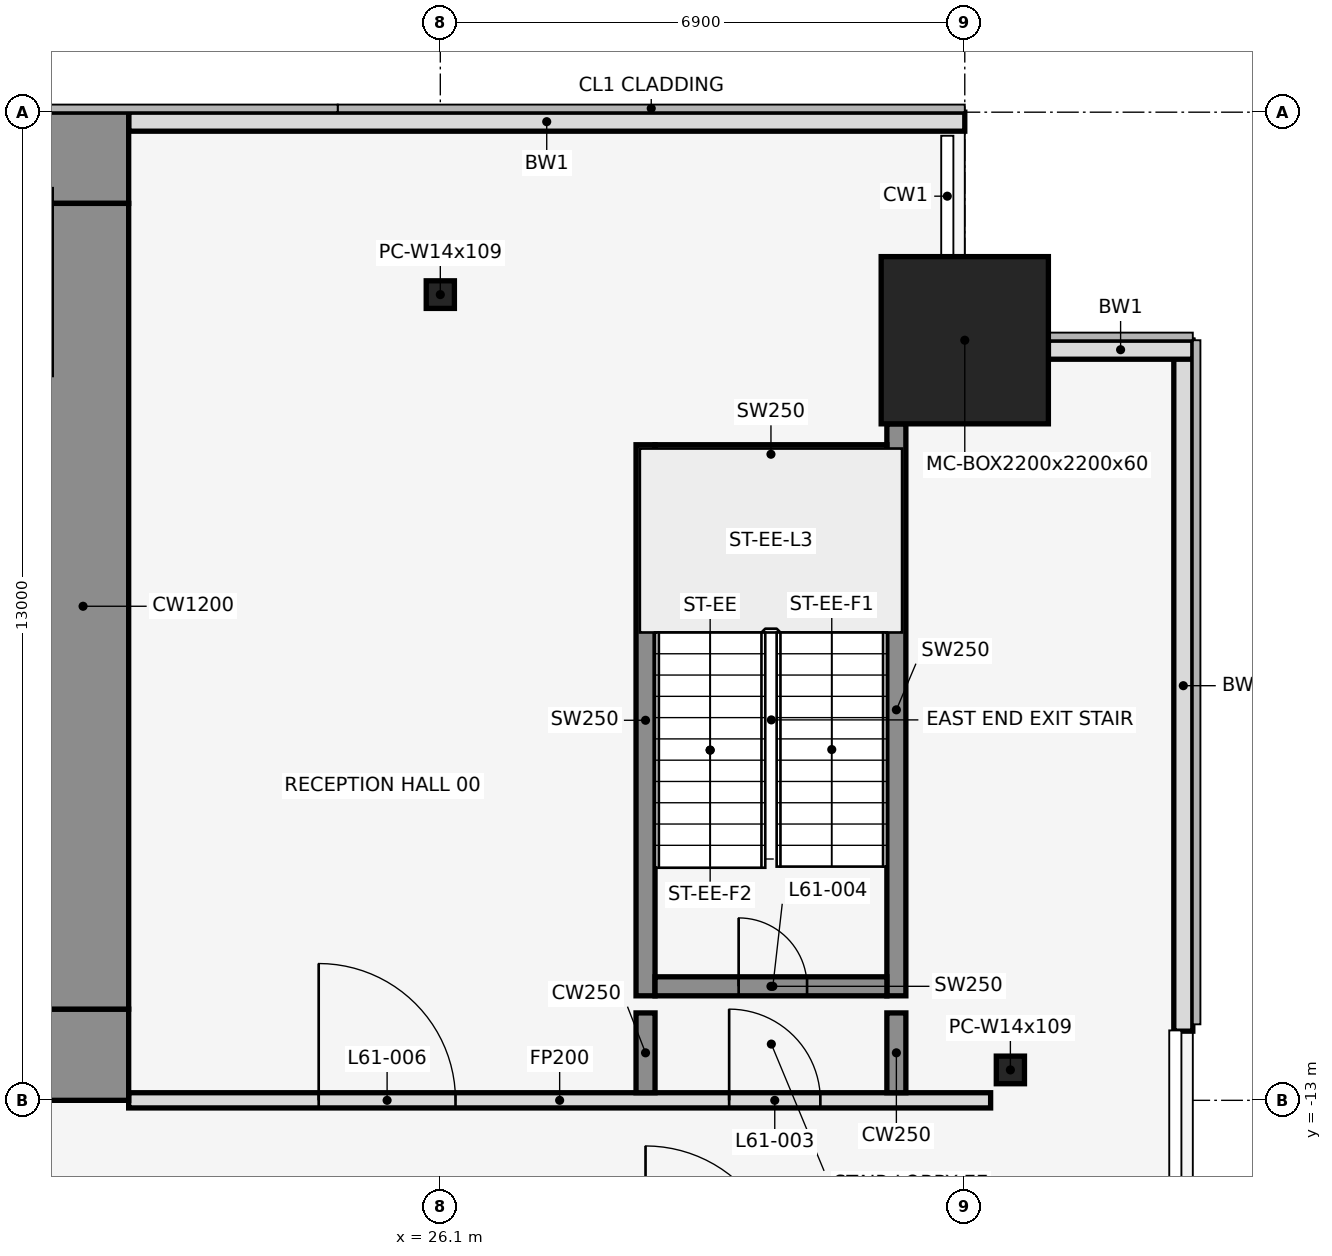
"""IFC4 building model, lengths in metres.
Left out: names, types, materials, properties, quantities, classifications, styles, units other than length and angle.
Written with IfcOpenShell. Run it as: python <this file> out.ifc"""

import sys

from ifc_helpers import new_model, si_unit, direction, frame, frame_2d, origin, origin_2d, place, context, subcontext, project, spatial, rectangle, hollow_rectangle, i_section, extrude, element, fill, save


model = new_model("IFC4")
c1 = context("Model", 3, precision=1e-05, world=origin(), true_north=direction((0.0, 1.0)))
c2 = subcontext(c1, "Body", "Model", "MODEL_VIEW")
j1 = project(units=[si_unit("LENGTHUNIT", "METRE"), si_unit("PLANEANGLEUNIT", "RADIAN")], contexts=[c1])
p1 = place(None, origin())
s1 = spatial("IfcSite", under=j1, at=p1, CompositionType="ELEMENT")
p2 = place(p1, origin())
s2 = spatial("IfcBuilding", under=s1, at=p2, CompositionType="ELEMENT")
p3 = place(p2, frame((0.0, 0.0, 270.8)))
s3 = spatial("IfcBuildingStorey", under=s2, at=p3, CompositionType="ELEMENT", Elevation=270.8)
p4 = place(p3, frame((26.1, -2.4, 0.0), z_axis=(0.0, 0.0, 1.0), x_axis=(1.0, 0.0, 0.0)))
e1 = element("IfcColumn", 1, at=p4, inside=s3, PredefinedType="COLUMN", context=c2, shape_type="SweptSolid", body=[
    extrude(i_section(OverallWidth=0.371, OverallDepth=0.363, WebThickness=0.013, FlangeThickness=0.022, at=origin_2d()), origin(), (0.0, 0.0, 1.0), 4.2),
])
p5 = place(p3, frame((33.0, -3.0, 0.0), z_axis=(0.0, 0.0, 1.0), x_axis=(1.0, 0.0, 0.0)))
e2 = element("IfcColumn", 2, at=p5, inside=s3, PredefinedType="COLUMN", context=c2, shape_type="SweptSolid", body=[
    extrude(hollow_rectangle(XDim=2.2, YDim=2.2, WallThickness=0.06, at=origin_2d()), origin(), (0.0, 0.0, 1.0), 4.2),
])
p6 = place(p3, frame((33.6, -12.6, 0.0), z_axis=(0.0, 0.0, 1.0), x_axis=(1.0, 0.0, 0.0)))
e3 = element("IfcColumn", 3, at=p6, inside=s3, PredefinedType="COLUMN", context=c2, shape_type="SweptSolid", body=[
    extrude(i_section(OverallWidth=0.371, OverallDepth=0.363, WebThickness=0.013, FlangeThickness=0.022, at=origin_2d()), origin(), (0.0, 0.0, 1.0), 4.2),
])
p7 = place(p3, frame((33.0, -0.125, 0.0), z_axis=(0.0, 0.0, 1.0), x_axis=(-1.0, 0.0, 0.0)))
e4 = element("IfcWall", 4, at=p7, inside=s3, PredefinedType="STANDARD", context=c2, shape_type="SweptSolid", body=[
    extrude(rectangle(XDim=11.0, YDim=0.25, at=frame_2d((5.5, 0.0))), origin(), (0.0, 0.0, 1.0), 4.05),
])
p8 = place(p3, frame((35.875, -12.09, 0.0), z_axis=(0.0, 0.0, 1.0), x_axis=(0.0, 1.0, 0.0)))
e5 = element("IfcWall", 5, at=p8, inside=s3, PredefinedType="STANDARD", context=c2, shape_type="SweptSolid", body=[
    extrude(rectangle(XDim=9.09, YDim=0.25, at=frame_2d((4.545, 0.0))), origin(), (0.0, 0.0, 1.0), 4.05),
])
p9 = place(p3, frame((36.0, -3.125, 0.0), z_axis=(0.0, 0.0, 1.0), x_axis=(-1.0, 0.0, 0.0)))
e6 = element("IfcWall", 6, at=p9, inside=s3, PredefinedType="STANDARD", context=c2, shape_type="SweptSolid", body=[
    extrude(rectangle(XDim=1.9, YDim=0.25, at=frame_2d((0.95, 0.0))), origin(), (0.0, 0.0, 1.0), 4.05),
])
p10 = place(p3, frame((28.8, -11.625, 0.0), z_axis=(0.0, 0.0, 1.0), x_axis=(0.0, 1.0, 0.0)))
e7 = element("IfcWall", 7, at=p10, inside=s3, PredefinedType="SHEAR", context=c2, shape_type="SweptSolid", body=[
    extrude(rectangle(XDim=7.25, YDim=0.25, at=frame_2d((3.625, 0.0))), origin(), (0.0, 0.0, 1.0), 4.2),
])
p11 = place(p3, frame((32.1, -11.625, 0.0), z_axis=(0.0, 0.0, 1.0), x_axis=(0.0, 1.0, 0.0)))
e8 = element("IfcWall", 8, at=p11, inside=s3, PredefinedType="SHEAR", context=c2, shape_type="SweptSolid", body=[
    extrude(rectangle(XDim=7.525, YDim=0.25, at=frame_2d((3.762, 0.0))), origin(), (0.0, 0.0, 1.0), 4.2),
])
p12 = place(p3, frame((28.925, -11.5, 0.0), z_axis=(0.0, 0.0, 1.0), x_axis=(1.0, 0.0, 0.0)))
e9 = element("IfcWall", 9, at=p12, inside=s3, PredefinedType="SHEAR", context=c2, shape_type="SweptSolid", body=[
    extrude(rectangle(XDim=3.05, YDim=0.25, at=frame_2d((1.525, 0.0))), origin(), (0.0, 0.0, 1.0), 4.2),
])
p13 = place(p12, frame((1.1, 0.0, 0.0)))
e10 = element("IfcOpeningElement", 10, at=p13, cuts=e9, PredefinedType="OPENING", context=c2, shape_type="SweptSolid", body=[
    extrude(rectangle(XDim=0.9, YDim=2.1, at=frame_2d((0.45, 1.05))), frame((0.0, 0.137, 0.0), z_axis=(0.0, -1.0, 0.0), x_axis=(1.0, 0.0, 0.0)), (0.0, 0.0, 1.0), 0.274),
])
p14 = place(p3, frame((28.925, -4.5, 0.0), z_axis=(0.0, 0.0, 1.0), x_axis=(1.0, 0.0, 0.0)))
e11 = element("IfcWall", 11, at=p14, inside=s3, PredefinedType="SHEAR", context=c2, shape_type="SweptSolid", body=[
    extrude(rectangle(XDim=3.05, YDim=0.25, at=frame_2d((1.525, 0.0))), origin(), (0.0, 0.0, 1.0), 4.2),
])
p15 = place(p3, frame((22.0, -13.0, 0.0), z_axis=(0.0, 0.0, 1.0), x_axis=(1.0, 0.0, 0.0)))
e12 = element("IfcWall", 12, at=p15, inside=s3, PredefinedType="PARTITIONING", context=c2, shape_type="SweptSolid", body=[
    extrude(rectangle(XDim=11.34, YDim=0.2, at=frame_2d((5.67, 0.0))), origin(), (0.0, 0.0, 1.0), 3.118),
])
p16 = place(p15, frame((7.9, 0.0, 0.0)))
e13 = element("IfcOpeningElement", 13, at=p16, cuts=e12, PredefinedType="OPENING", context=c2, shape_type="SweptSolid", body=[
    extrude(rectangle(XDim=1.2, YDim=2.1, at=frame_2d((0.6, 1.05))), frame((0.0, 0.112, 0.0), z_axis=(0.0, -1.0, 0.0), x_axis=(1.0, 0.0, 0.0)), (0.0, 0.0, 1.0), 0.224),
])
p17 = place(p15, frame((2.5, 0.0, 0.0)))
e14 = element("IfcOpeningElement", 14, at=p17, cuts=e12, PredefinedType="OPENING", context=c2, shape_type="SweptSolid", body=[
    extrude(rectangle(XDim=1.8, YDim=2.1, at=frame_2d((0.9, 1.05))), frame((0.0, 0.112, 0.0), z_axis=(0.0, -1.0, 0.0), x_axis=(1.0, 0.0, 0.0)), (0.0, 0.0, 1.0), 0.224),
])
for number, where, z_axis, x_axis in (
    (15, (28.8, -12.9, 0.0), (0.0, 0.0, 1.0), (0.0, 1.0, 0.0)),
    (16, (32.1, -12.9, 0.0), (0.0, 0.0, 1.0), (0.0, 1.0, 0.0)),
):
    element("IfcWall", number, at=place(p3, frame(where, z_axis=z_axis, x_axis=x_axis)), inside=s3, PredefinedType="SHEAR", context=c2, shape_type="SweptSolid", body=[
        extrude(rectangle(XDim=1.05, YDim=0.25, at=frame_2d((0.525, 0.0))), origin(), (0.0, 0.0, 1.0), 4.2),
    ])
p18 = place(p3, frame((-22.0, -0.6, 0.0), z_axis=(0.0, 0.0, 1.0), x_axis=(1.0, 0.0, 0.0)))
e17 = element("IfcWall", 17, at=p18, inside=s3, PredefinedType="SHEAR", context=c2, shape_type="SweptSolid", body=[
    extrude(rectangle(XDim=44.0, YDim=1.2, at=frame_2d((22.0, 0.0))), origin(), (0.0, 0.0, 1.0), 4.2),
])
p19 = place(p18, frame((18.55, 0.0, 0.0)))
e18 = element("IfcOpeningElement", 18, at=p19, cuts=e17, PredefinedType="OPENING", context=c2, shape_type="SweptSolid", body=[
    extrude(rectangle(XDim=0.9, YDim=2.1, at=frame_2d((0.45, 1.05))), frame((0.0, 0.612, 0.0), z_axis=(0.0, -1.0, 0.0), x_axis=(1.0, 0.0, 0.0)), (0.0, 0.0, 1.0), 1.224),
])
p20 = place(p18, frame((24.55, 0.0, 0.0)))
e19 = element("IfcOpeningElement", 19, at=p20, cuts=e17, PredefinedType="OPENING", context=c2, shape_type="SweptSolid", body=[
    extrude(rectangle(XDim=0.9, YDim=2.1, at=frame_2d((0.45, 1.05))), frame((0.0, 0.612, 0.0), z_axis=(0.0, -1.0, 0.0), x_axis=(1.0, 0.0, 0.0)), (0.0, 0.0, 1.0), 1.224),
])
p21 = place(p3, frame((-22.0, -12.4, 0.0), z_axis=(0.0, 0.0, 1.0), x_axis=(1.0, 0.0, 0.0)))
e20 = element("IfcWall", 20, at=p21, inside=s3, PredefinedType="SHEAR", context=c2, shape_type="SweptSolid", body=[
    extrude(rectangle(XDim=44.0, YDim=1.2, at=frame_2d((22.0, 0.0))), origin(), (0.0, 0.0, 1.0), 4.2),
])
p22 = place(p21, frame((2.2, 0.0, 0.0)))
e21 = element("IfcOpeningElement", 21, at=p22, cuts=e20, PredefinedType="OPENING", context=c2, shape_type="SweptSolid", body=[
    extrude(rectangle(XDim=1.2, YDim=2.1, at=frame_2d((0.6, 1.05))), frame((0.0, 0.612, 0.0), z_axis=(0.0, -1.0, 0.0), x_axis=(1.0, 0.0, 0.0)), (0.0, 0.0, 1.0), 1.224),
])
p23 = place(p21, frame((21.4, 0.0, 0.0)))
e22 = element("IfcOpeningElement", 22, at=p23, cuts=e20, PredefinedType="OPENING", context=c2, shape_type="SweptSolid", body=[
    extrude(rectangle(XDim=1.2, YDim=2.1, at=frame_2d((0.6, 1.05))), frame((0.0, 0.612, 0.0), z_axis=(0.0, -1.0, 0.0), x_axis=(1.0, 0.0, 0.0)), (0.0, 0.0, 1.0), 1.224),
])
p24 = place(p21, frame((40.6, 0.0, 0.0)))
e23 = element("IfcOpeningElement", 23, at=p24, cuts=e20, PredefinedType="OPENING", context=c2, shape_type="SweptSolid", body=[
    extrude(rectangle(XDim=1.2, YDim=2.1, at=frame_2d((0.6, 1.05))), frame((0.0, 0.612, 0.0), z_axis=(0.0, -1.0, 0.0), x_axis=(1.0, 0.0, 0.0)), (0.0, 0.0, 1.0), 1.224),
])
p25 = place(p21, frame((16.0, 0.0, 0.0)))
e24 = element("IfcOpeningElement", 24, at=p25, cuts=e20, PredefinedType="OPENING", context=c2, shape_type="SweptSolid", body=[
    extrude(rectangle(XDim=1.8, YDim=2.1, at=frame_2d((0.9, 1.05))), frame((0.0, 0.612, 0.0), z_axis=(0.0, -1.0, 0.0), x_axis=(1.0, 0.0, 0.0)), (0.0, 0.0, 1.0), 1.224),
])
p26 = place(p21, frame((6.3, 0.0, 0.0)))
e25 = element("IfcOpeningElement", 25, at=p26, cuts=e20, PredefinedType="OPENING", context=c2, shape_type="SweptSolid", body=[
    extrude(rectangle(XDim=1.2, YDim=2.1, at=frame_2d((0.6, 1.05))), frame((0.0, 0.612, 0.0), z_axis=(0.0, -1.0, 0.0), x_axis=(1.0, 0.0, 0.0)), (0.0, 0.0, 1.0), 1.224),
])
p27 = place(p21, frame((26.2, 0.0, 0.0)))
e26 = element("IfcOpeningElement", 26, at=p27, cuts=e20, PredefinedType="OPENING", context=c2, shape_type="SweptSolid", body=[
    extrude(rectangle(XDim=1.8, YDim=2.1, at=frame_2d((0.9, 1.05))), frame((0.0, 0.612, 0.0), z_axis=(0.0, -1.0, 0.0), x_axis=(1.0, 0.0, 0.0)), (0.0, 0.0, 1.0), 1.224),
])
p28 = place(p21, frame((36.5, 0.0, 0.0)))
e27 = element("IfcOpeningElement", 27, at=p28, cuts=e20, PredefinedType="OPENING", context=c2, shape_type="SweptSolid", body=[
    extrude(rectangle(XDim=1.2, YDim=2.1, at=frame_2d((0.6, 1.05))), frame((0.0, 0.612, 0.0), z_axis=(0.0, -1.0, 0.0), x_axis=(1.0, 0.0, 0.0)), (0.0, 0.0, 1.0), 1.224),
])
p29 = place(p3, frame((21.4, -11.8, 0.0), z_axis=(0.0, 0.0, 1.0), x_axis=(0.0, 1.0, 0.0)))
e28 = element("IfcWall", 28, at=p29, inside=s3, PredefinedType="SHEAR", context=c2, shape_type="SweptSolid", body=[
    extrude(rectangle(XDim=10.6, YDim=1.2, at=frame_2d((5.3, 0.0))), origin(), (0.0, 0.0, 1.0), 4.2),
])
p30 = place(p16, origin())
e29 = element("IfcDoor", 29, at=p30, inside=s3, OperationType="SINGLE_SWING_RIGHT", PredefinedType="DOOR", context=c2, shape_type="SweptSolid", body=[
    extrude(rectangle(XDim=1.2, YDim=2.1, at=frame_2d((0.6, 1.05))), frame((0.0, 0.025, 0.0), z_axis=(0.0, -1.0, 0.0), x_axis=(1.0, 0.0, 0.0)), (0.0, 0.0, 1.0), 0.05),
])
fill(e13, e29)
p31 = place(p13, origin())
e30 = element("IfcDoor", 30, at=p31, inside=s3, OperationType="SINGLE_SWING_LEFT", PredefinedType="DOOR", context=c2, shape_type="SweptSolid", body=[
    extrude(rectangle(XDim=0.9, YDim=2.1, at=frame_2d((0.45, 1.05))), frame((0.0, 0.025, 0.0), z_axis=(0.0, -1.0, 0.0), x_axis=(1.0, 0.0, 0.0)), (0.0, 0.0, 1.0), 0.05),
])
fill(e10, e30)
p32 = place(p17, origin())
e31 = element("IfcDoor", 31, at=p32, inside=s3, OperationType="SINGLE_SWING_LEFT", PredefinedType="DOOR", context=c2, shape_type="SweptSolid", body=[
    extrude(rectangle(XDim=1.8, YDim=2.1, at=frame_2d((0.9, 1.05))), frame((0.0, 0.025, 0.0), z_axis=(0.0, -1.0, 0.0), x_axis=(1.0, 0.0, 0.0)), (0.0, 0.0, 1.0), 0.05),
])
fill(e14, e31)
save(model, sys.argv[1])
